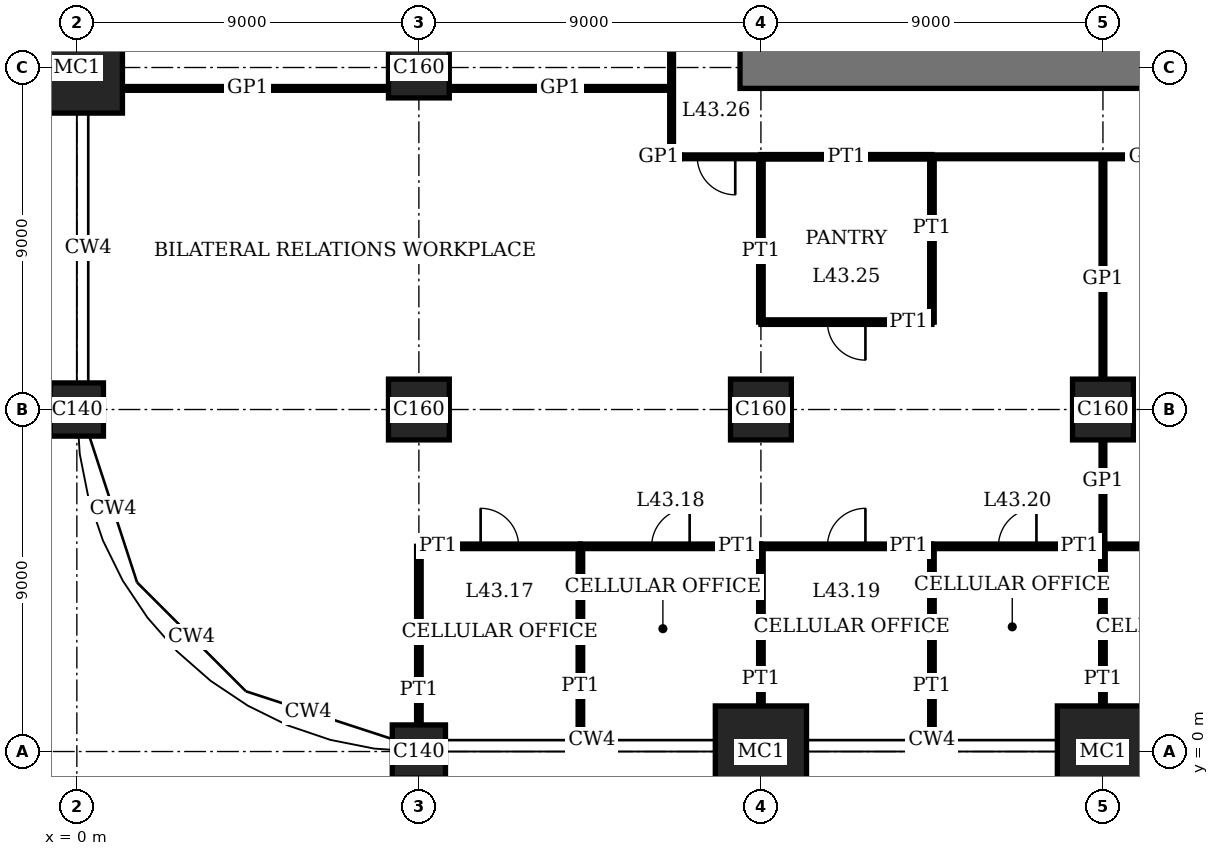
"""IFC4 building model, lengths in metres.
Left out: names, types, materials, properties, quantities, classifications, styles, units other than length and angle.
Written with IfcOpenShell. Run it as: python <this file> out.ifc"""

import sys

from ifc_helpers import new_model, si_unit, direction, frame, frame_2d, origin, origin_2d, place, context, subcontext, project, spatial, rectangle, extrude, element, fill, save


model = new_model("IFC4")
c1 = context("Model", 3, precision=1e-05, world=origin(), true_north=direction((0.0, 1.0)))
c2 = subcontext(c1, "Body", "Model", "MODEL_VIEW")
j1 = project(units=[si_unit("LENGTHUNIT", "METRE"), si_unit("PLANEANGLEUNIT", "RADIAN")], contexts=[c1])
p1 = place(None, origin())
s1 = spatial("IfcSite", under=j1, at=p1, CompositionType="ELEMENT")
p2 = place(p1, origin())
s2 = spatial("IfcBuilding", under=s1, at=p2, CompositionType="ELEMENT")
p3 = place(p2, frame((0.0, 0.0, 178.2)))
s3 = spatial("IfcBuildingStorey", under=s2, at=p3, CompositionType="ELEMENT", Elevation=178.2)
p4 = place(p3, frame((0.0, 9.0, 0.0), z_axis=(0.0, 0.0, 1.0), x_axis=(1.0, 0.0, 0.0)))
e1 = element("IfcColumn", 1, at=p4, inside=s3, PredefinedType="COLUMN", context=c2, shape_type="SweptSolid", body=[
    extrude(rectangle(XDim=1.4, YDim=1.4, at=origin_2d()), origin(), (0.0, 0.0, 1.0), 4.0),
])
p5 = place(p3, frame((0.0, 18.0, 0.0), z_axis=(0.0, 0.0, 1.0), x_axis=(1.0, 0.0, 0.0)))
e2 = element("IfcColumn", 2, at=p5, inside=s3, PredefinedType="COLUMN", context=c2, shape_type="SweptSolid", body=[
    extrude(rectangle(XDim=2.4, YDim=2.4, at=origin_2d()), origin(), (0.0, 0.0, 1.0), 4.0),
])
p6 = place(p3, frame((9.0, 0.0, 0.0), z_axis=(0.0, 0.0, 1.0), x_axis=(1.0, 0.0, 0.0)))
e3 = element("IfcColumn", 3, at=p6, inside=s3, PredefinedType="COLUMN", context=c2, shape_type="SweptSolid", body=[
    extrude(rectangle(XDim=1.4, YDim=1.4, at=origin_2d()), origin(), (0.0, 0.0, 1.0), 4.0),
])
for number, where, z_axis, x_axis in (
    (4, (9.0, 9.0, 0.0), (0.0, 0.0, 1.0), (1.0, 0.0, 0.0)),
    (5, (9.0, 18.0, 0.0), (0.0, 0.0, 1.0), (1.0, 0.0, 0.0)),
):
    element("IfcColumn", number, at=place(p3, frame(where, z_axis=z_axis, x_axis=x_axis)), inside=s3, PredefinedType="COLUMN", context=c2, shape_type="SweptSolid", body=[
        extrude(rectangle(XDim=1.6, YDim=1.6, at=origin_2d()), origin(), (0.0, 0.0, 1.0), 4.0),
    ])
p7 = place(p3, frame((18.0, 0.0, 0.0), z_axis=(0.0, 0.0, 1.0), x_axis=(1.0, 0.0, 0.0)))
e6 = element("IfcColumn", 6, at=p7, inside=s3, PredefinedType="COLUMN", context=c2, shape_type="SweptSolid", body=[
    extrude(rectangle(XDim=2.4, YDim=2.4, at=origin_2d()), origin(), (0.0, 0.0, 1.0), 4.0),
])
p8 = place(p3, frame((18.0, 9.0, 0.0), z_axis=(0.0, 0.0, 1.0), x_axis=(1.0, 0.0, 0.0)))
e7 = element("IfcColumn", 7, at=p8, inside=s3, PredefinedType="COLUMN", context=c2, shape_type="SweptSolid", body=[
    extrude(rectangle(XDim=1.6, YDim=1.6, at=origin_2d()), origin(), (0.0, 0.0, 1.0), 4.0),
])
p9 = place(p3, frame((27.0, 0.0, 0.0), z_axis=(0.0, 0.0, 1.0), x_axis=(1.0, 0.0, 0.0)))
e8 = element("IfcColumn", 8, at=p9, inside=s3, PredefinedType="COLUMN", context=c2, shape_type="SweptSolid", body=[
    extrude(rectangle(XDim=2.4, YDim=2.4, at=origin_2d()), origin(), (0.0, 0.0, 1.0), 4.0),
])
p10 = place(p3, frame((27.0, 9.0, 0.0), z_axis=(0.0, 0.0, 1.0), x_axis=(1.0, 0.0, 0.0)))
e9 = element("IfcColumn", 9, at=p10, inside=s3, PredefinedType="COLUMN", context=c2, shape_type="SweptSolid", body=[
    extrude(rectangle(XDim=1.6, YDim=1.6, at=origin_2d()), origin(), (0.0, 0.0, 1.0), 4.0),
])
p11 = place(p3, frame((17.45, 18.0, 0.0), z_axis=(0.0, 0.0, 1.0), x_axis=(1.0, 0.0, 0.0)))
e10 = element("IfcWall", 10, at=p11, inside=s3, PredefinedType="SHEAR", context=c2, shape_type="SweptSolid", body=[
    extrude(rectangle(XDim=28.1, YDim=1.1, at=frame_2d((14.05, 0.0))), origin(), (0.0, 0.0, 1.0), 4.0),
])
p12 = place(p11, frame((11.55, 0.0, 0.0)))
e11 = element("IfcOpeningElement", 11, at=p12, cuts=e10, PredefinedType="OPENING", context=c2, shape_type="SweptSolid", body=[
    extrude(rectangle(XDim=1.0, YDim=2.4, at=frame_2d((0.5, 1.2))), frame((0.0, 0.56, 0.0), z_axis=(0.0, -1.0, 0.0), x_axis=(1.0, 0.0, 0.0)), (0.0, 0.0, 1.0), 1.12),
])
p13 = place(p11, frame((16.55, 0.0, 0.0)))
e12 = element("IfcOpeningElement", 12, at=p13, cuts=e10, PredefinedType="OPENING", context=c2, shape_type="SweptSolid", body=[
    extrude(rectangle(XDim=1.0, YDim=2.4, at=frame_2d((0.5, 1.2))), frame((0.0, 0.56, 0.0), z_axis=(0.0, -1.0, 0.0), x_axis=(1.0, 0.0, 0.0)), (0.0, 0.0, 1.0), 1.12),
])
p14 = place(p11, frame((20.0, 0.0, 0.0)))
e13 = element("IfcOpeningElement", 13, at=p14, cuts=e10, PredefinedType="OPENING", context=c2, shape_type="SweptSolid", body=[
    extrude(rectangle(XDim=1.1, YDim=2.4, at=frame_2d((0.55, 1.2))), frame((0.0, 0.56, 0.0), z_axis=(0.0, -1.0, 0.0), x_axis=(1.0, 0.0, 0.0)), (0.0, 0.0, 1.0), 1.12),
])
p15 = place(p11, frame((24.05, 0.0, 0.0)))
e14 = element("IfcOpeningElement", 14, at=p15, cuts=e10, PredefinedType="OPENING", context=c2, shape_type="SweptSolid", body=[
    extrude(rectangle(XDim=1.0, YDim=2.4, at=frame_2d((0.5, 1.2))), frame((0.0, 0.56, 0.0), z_axis=(0.0, -1.0, 0.0), x_axis=(1.0, 0.0, 0.0)), (0.0, 0.0, 1.0), 1.12),
])
p16 = place(p3, frame((9.0, 5.4, 0.0), z_axis=(0.0, 0.0, 1.0), x_axis=(1.0, 0.0, 0.0)))
e15 = element("IfcWall", 15, at=p16, inside=s3, PredefinedType="PARTITIONING", context=c2, shape_type="SweptSolid", body=[
    extrude(rectangle(XDim=4.25, YDim=0.12, at=frame_2d((2.125, 0.0))), origin(), (0.0, 0.0, 1.0), 3.75),
])
p17 = place(p16, frame((1.625, 0.0, 0.0)))
e16 = element("IfcOpeningElement", 16, at=p17, cuts=e15, PredefinedType="OPENING", context=c2, shape_type="SweptSolid", body=[
    extrude(rectangle(XDim=1.0, YDim=2.4, at=frame_2d((0.5, 1.2))), frame((0.0, 0.07, 0.0), z_axis=(0.0, -1.0, 0.0), x_axis=(1.0, 0.0, 0.0)), (0.0, 0.0, 1.0), 0.14),
])
p18 = place(p3, frame((13.25, 5.4, 0.0), z_axis=(0.0, 0.0, 1.0), x_axis=(1.0, 0.0, 0.0)))
e17 = element("IfcWall", 17, at=p18, inside=s3, PredefinedType="PARTITIONING", context=c2, shape_type="SweptSolid", body=[
    extrude(rectangle(XDim=4.75, YDim=0.12, at=frame_2d((2.375, 0.0))), origin(), (0.0, 0.0, 1.0), 3.75),
])
p19 = place(p18, frame((1.875, 0.0, 0.0)))
e18 = element("IfcOpeningElement", 18, at=p19, cuts=e17, PredefinedType="OPENING", context=c2, shape_type="SweptSolid", body=[
    extrude(rectangle(XDim=1.0, YDim=2.4, at=frame_2d((0.5, 1.2))), frame((0.0, 0.07, 0.0), z_axis=(0.0, -1.0, 0.0), x_axis=(1.0, 0.0, 0.0)), (0.0, 0.0, 1.0), 0.14),
])
p20 = place(p3, frame((18.0, 5.4, 0.0), z_axis=(0.0, 0.0, 1.0), x_axis=(1.0, 0.0, 0.0)))
e19 = element("IfcWall", 19, at=p20, inside=s3, PredefinedType="PARTITIONING", context=c2, shape_type="SweptSolid", body=[
    extrude(rectangle(XDim=4.5, YDim=0.12, at=frame_2d((2.25, 0.0))), origin(), (0.0, 0.0, 1.0), 3.75),
])
p21 = place(p20, frame((1.75, 0.0, 0.0)))
e20 = element("IfcOpeningElement", 20, at=p21, cuts=e19, PredefinedType="OPENING", context=c2, shape_type="SweptSolid", body=[
    extrude(rectangle(XDim=1.0, YDim=2.4, at=frame_2d((0.5, 1.2))), frame((0.0, 0.07, 0.0), z_axis=(0.0, -1.0, 0.0), x_axis=(1.0, 0.0, 0.0)), (0.0, 0.0, 1.0), 0.14),
])
p22 = place(p3, frame((22.5, 5.4, 0.0), z_axis=(0.0, 0.0, 1.0), x_axis=(1.0, 0.0, 0.0)))
e21 = element("IfcWall", 21, at=p22, inside=s3, PredefinedType="PARTITIONING", context=c2, shape_type="SweptSolid", body=[
    extrude(rectangle(XDim=4.5, YDim=0.12, at=frame_2d((2.25, 0.0))), origin(), (0.0, 0.0, 1.0), 3.75),
])
p23 = place(p22, frame((1.75, 0.0, 0.0)))
e22 = element("IfcOpeningElement", 22, at=p23, cuts=e21, PredefinedType="OPENING", context=c2, shape_type="SweptSolid", body=[
    extrude(rectangle(XDim=1.0, YDim=2.4, at=frame_2d((0.5, 1.2))), frame((0.0, 0.07, 0.0), z_axis=(0.0, -1.0, 0.0), x_axis=(1.0, 0.0, 0.0)), (0.0, 0.0, 1.0), 0.14),
])
p24 = place(p3, frame((27.0, 5.4, 0.0), z_axis=(0.0, 0.0, 1.0), x_axis=(1.0, 0.0, 0.0)))
e23 = element("IfcWall", 23, at=p24, inside=s3, PredefinedType="PARTITIONING", context=c2, shape_type="SweptSolid", body=[
    extrude(rectangle(XDim=4.5, YDim=0.12, at=frame_2d((2.25, 0.0))), origin(), (0.0, 0.0, 1.0), 3.75),
])
p25 = place(p24, frame((1.75, 0.0, 0.0)))
e24 = element("IfcOpeningElement", 24, at=p25, cuts=e23, PredefinedType="OPENING", context=c2, shape_type="SweptSolid", body=[
    extrude(rectangle(XDim=1.0, YDim=2.4, at=frame_2d((0.5, 1.2))), frame((0.0, 0.07, 0.0), z_axis=(0.0, -1.0, 0.0), x_axis=(1.0, 0.0, 0.0)), (0.0, 0.0, 1.0), 0.14),
])
p26 = place(p3, frame((18.0, 11.3, 0.0), z_axis=(0.0, 0.0, 1.0), x_axis=(1.0, 0.0, 0.0)))
e25 = element("IfcWall", 25, at=p26, inside=s3, PredefinedType="PARTITIONING", context=c2, shape_type="SweptSolid", body=[
    extrude(rectangle(XDim=4.5, YDim=0.12, at=frame_2d((2.25, 0.0))), origin(), (0.0, 0.0, 1.0), 3.75),
])
p27 = place(p26, frame((1.75, 0.0, 0.0)))
e26 = element("IfcOpeningElement", 26, at=p27, cuts=e25, PredefinedType="OPENING", context=c2, shape_type="SweptSolid", body=[
    extrude(rectangle(XDim=1.0, YDim=2.4, at=frame_2d((0.5, 1.2))), frame((0.0, 0.07, 0.0), z_axis=(0.0, -1.0, 0.0), x_axis=(1.0, 0.0, 0.0)), (0.0, 0.0, 1.0), 0.14),
])
p28 = place(p3, frame((18.0, 15.65, 0.0), z_axis=(0.0, 0.0, 1.0), x_axis=(1.0, 0.0, 0.0)))
e27 = element("IfcWall", 27, at=p28, inside=s3, PredefinedType="PARTITIONING", context=c2, shape_type="SweptSolid", body=[
    extrude(rectangle(XDim=4.5, YDim=0.12, at=frame_2d((2.25, 0.0))), origin(), (0.0, 0.0, 1.0), 3.75),
])
p29 = place(p3, frame((15.65, 15.65, 0.0), z_axis=(0.0, 0.0, 1.0), x_axis=(1.0, 0.0, 0.0)))
e28 = element("IfcWall", 28, at=p29, inside=s3, PredefinedType="PARTITIONING", context=c2, shape_type="SweptSolid", body=[
    extrude(rectangle(XDim=2.35, YDim=0.1, at=frame_2d((1.175, 0.0))), origin(), (0.0, 0.0, 1.0), 3.75),
])
p30 = place(p29, frame((0.675, 0.0, 0.0)))
e29 = element("IfcOpeningElement", 29, at=p30, cuts=e28, PredefinedType="OPENING", context=c2, shape_type="SweptSolid", body=[
    extrude(rectangle(XDim=1.0, YDim=2.4, at=frame_2d((0.5, 1.2))), frame((0.0, 0.06, 0.0), z_axis=(0.0, -1.0, 0.0), x_axis=(1.0, 0.0, 0.0)), (0.0, 0.0, 1.0), 0.12),
])
p31 = place(p3, frame((22.5, 15.65, 0.0), z_axis=(0.0, 0.0, 1.0), x_axis=(1.0, 0.0, 0.0)))
e30 = element("IfcWall", 30, at=p31, inside=s3, PredefinedType="PARTITIONING", context=c2, shape_type="SweptSolid", body=[
    extrude(rectangle(XDim=24.85, YDim=0.1, at=frame_2d((12.425, 0.0))), origin(), (0.0, 0.0, 1.0), 3.75),
])
p32 = place(p31, frame((11.925, 0.0, 0.0)))
e31 = element("IfcOpeningElement", 31, at=p32, cuts=e30, PredefinedType="OPENING", context=c2, shape_type="SweptSolid", body=[
    extrude(rectangle(XDim=1.0, YDim=2.4, at=frame_2d((0.5, 1.2))), frame((0.0, 0.06, 0.0), z_axis=(0.0, -1.0, 0.0), x_axis=(1.0, 0.0, 0.0)), (0.0, 0.0, 1.0), 0.12),
])
p33 = place(p3, frame((1.2, 17.45, 0.0), z_axis=(0.0, 0.0, 1.0), x_axis=(1.0, 0.0, 0.0)))
e32 = element("IfcWall", 32, at=p33, inside=s3, PredefinedType="PARTITIONING", context=c2, shape_type="SweptSolid", body=[
    extrude(rectangle(XDim=7.0, YDim=0.1, at=frame_2d((3.5, 0.0))), origin(), (0.0, 0.0, 1.0), 3.75),
])
p34 = place(p3, frame((9.8, 17.45, 0.0), z_axis=(0.0, 0.0, 1.0), x_axis=(1.0, 0.0, 0.0)))
e33 = element("IfcWall", 33, at=p34, inside=s3, PredefinedType="PARTITIONING", context=c2, shape_type="SweptSolid", body=[
    extrude(rectangle(XDim=5.85, YDim=0.1, at=frame_2d((2.925, 0.0))), origin(), (0.0, 0.0, 1.0), 3.75),
])
p35 = place(p3, frame((9.0, 0.7, 0.0), z_axis=(0.0, 0.0, 1.0), x_axis=(0.0, 1.0, 0.0)))
e34 = element("IfcWall", 34, at=p35, inside=s3, PredefinedType="PARTITIONING", context=c2, shape_type="SweptSolid", body=[
    extrude(rectangle(XDim=4.7, YDim=0.12, at=frame_2d((2.35, 0.0))), origin(), (0.0, 0.0, 1.0), 3.05),
])
p36 = place(p3, frame((13.25, 0.31, 0.0), z_axis=(0.0, 0.0, 1.0), x_axis=(0.0, 1.0, 0.0)))
e35 = element("IfcWall", 35, at=p36, inside=s3, PredefinedType="PARTITIONING", context=c2, shape_type="SweptSolid", body=[
    extrude(rectangle(XDim=5.09, YDim=0.12, at=frame_2d((2.545, 0.0))), origin(), (0.0, 0.0, 1.0), 3.75),
])
p37 = place(p3, frame((15.65, 15.65, 0.0), z_axis=(0.0, 0.0, 1.0), x_axis=(0.0, 1.0, 0.0)))
e36 = element("IfcWall", 36, at=p37, inside=s3, PredefinedType="PARTITIONING", context=c2, shape_type="SweptSolid", body=[
    extrude(rectangle(XDim=6.85, YDim=0.1, at=frame_2d((3.425, 0.0))), origin(), (0.0, 0.0, 1.0), 3.75),
])
p38 = place(p37, frame((2.925, 0.0, 0.0)))
e37 = element("IfcOpeningElement", 37, at=p38, cuts=e36, PredefinedType="OPENING", context=c2, shape_type="SweptSolid", body=[
    extrude(rectangle(XDim=1.0, YDim=2.4, at=frame_2d((0.5, 1.2))), frame((0.0, 0.06, 0.0), z_axis=(0.0, -1.0, 0.0), x_axis=(1.0, 0.0, 0.0)), (0.0, 0.0, 1.0), 0.12),
])
p39 = place(p3, frame((18.0, 1.2, 0.0), z_axis=(0.0, 0.0, 1.0), x_axis=(0.0, 1.0, 0.0)))
e38 = element("IfcWall", 38, at=p39, inside=s3, PredefinedType="PARTITIONING", context=c2, shape_type="SweptSolid", body=[
    extrude(rectangle(XDim=4.2, YDim=0.12, at=frame_2d((2.1, 0.0))), origin(), (0.0, 0.0, 1.0), 3.05),
])
p40 = place(p3, frame((18.0, 11.3, 0.0), z_axis=(0.0, 0.0, 1.0), x_axis=(0.0, 1.0, 0.0)))
e39 = element("IfcWall", 39, at=p40, inside=s3, PredefinedType="PARTITIONING", context=c2, shape_type="SweptSolid", body=[
    extrude(rectangle(XDim=4.35, YDim=0.12, at=frame_2d((2.175, 0.0))), origin(), (0.0, 0.0, 1.0), 3.05),
])
p41 = place(p3, frame((22.5, 0.31, 0.0), z_axis=(0.0, 0.0, 1.0), x_axis=(0.0, 1.0, 0.0)))
e40 = element("IfcWall", 40, at=p41, inside=s3, PredefinedType="PARTITIONING", context=c2, shape_type="SweptSolid", body=[
    extrude(rectangle(XDim=5.09, YDim=0.12, at=frame_2d((2.545, 0.0))), origin(), (0.0, 0.0, 1.0), 3.75),
])
p42 = place(p3, frame((22.5, 11.3, 0.0), z_axis=(0.0, 0.0, 1.0), x_axis=(0.0, 1.0, 0.0)))
e41 = element("IfcWall", 41, at=p42, inside=s3, PredefinedType="PARTITIONING", context=c2, shape_type="SweptSolid", body=[
    extrude(rectangle(XDim=4.35, YDim=0.12, at=frame_2d((2.175, 0.0))), origin(), (0.0, 0.0, 1.0), 3.75),
])
p43 = place(p3, frame((27.0, 1.2, 0.0), z_axis=(0.0, 0.0, 1.0), x_axis=(0.0, 1.0, 0.0)))
e42 = element("IfcWall", 42, at=p43, inside=s3, PredefinedType="PARTITIONING", context=c2, shape_type="SweptSolid", body=[
    extrude(rectangle(XDim=4.2, YDim=0.12, at=frame_2d((2.1, 0.0))), origin(), (0.0, 0.0, 1.0), 3.05),
])
p44 = place(p3, frame((27.0, 5.4, 0.0), z_axis=(0.0, 0.0, 1.0), x_axis=(0.0, 1.0, 0.0)))
e43 = element("IfcWall", 43, at=p44, inside=s3, PredefinedType="PARTITIONING", context=c2, shape_type="SweptSolid", body=[
    extrude(rectangle(XDim=2.8, YDim=0.1, at=frame_2d((1.4, 0.0))), origin(), (0.0, 0.0, 1.0), 3.05),
])
p45 = place(p3, frame((27.0, 9.8, 0.0), z_axis=(0.0, 0.0, 1.0), x_axis=(0.0, 1.0, 0.0)))
e44 = element("IfcWall", 44, at=p45, inside=s3, PredefinedType="PARTITIONING", context=c2, shape_type="SweptSolid", body=[
    extrude(rectangle(XDim=5.85, YDim=0.1, at=frame_2d((2.925, 0.0))), origin(), (0.0, 0.0, 1.0), 3.05),
])
p46 = place(p17, origin())
e45 = element("IfcDoor", 45, at=p46, inside=s3, OperationType="SINGLE_SWING_RIGHT", PredefinedType="DOOR", context=c2, shape_type="SweptSolid", body=[
    extrude(rectangle(XDim=1.0, YDim=2.4, at=frame_2d((0.5, 1.2))), frame((0.0, 0.025, 0.0), z_axis=(0.0, -1.0, 0.0), x_axis=(1.0, 0.0, 0.0)), (0.0, 0.0, 1.0), 0.05),
])
fill(e16, e45)
p47 = place(p19, origin())
e46 = element("IfcDoor", 46, at=p47, inside=s3, OperationType="SINGLE_SWING_LEFT", PredefinedType="DOOR", context=c2, shape_type="SweptSolid", body=[
    extrude(rectangle(XDim=1.0, YDim=2.4, at=frame_2d((0.5, 1.2))), frame((0.0, 0.025, 0.0), z_axis=(0.0, -1.0, 0.0), x_axis=(1.0, 0.0, 0.0)), (0.0, 0.0, 1.0), 0.05),
])
fill(e18, e46)
p48 = place(p21, origin())
e47 = element("IfcDoor", 47, at=p48, inside=s3, OperationType="SINGLE_SWING_LEFT", PredefinedType="DOOR", context=c2, shape_type="SweptSolid", body=[
    extrude(rectangle(XDim=1.0, YDim=2.4, at=frame_2d((0.5, 1.2))), frame((0.0, 0.025, 0.0), z_axis=(0.0, -1.0, 0.0), x_axis=(1.0, 0.0, 0.0)), (0.0, 0.0, 1.0), 0.05),
])
fill(e20, e47)
p49 = place(p23, origin())
e48 = element("IfcDoor", 48, at=p49, inside=s3, OperationType="SINGLE_SWING_LEFT", PredefinedType="DOOR", context=c2, shape_type="SweptSolid", body=[
    extrude(rectangle(XDim=1.0, YDim=2.4, at=frame_2d((0.5, 1.2))), frame((0.0, 0.025, 0.0), z_axis=(0.0, -1.0, 0.0), x_axis=(1.0, 0.0, 0.0)), (0.0, 0.0, 1.0), 0.05),
])
fill(e22, e48)
p50 = place(p27, origin())
e49 = element("IfcDoor", 49, at=p50, inside=s3, OperationType="SINGLE_SWING_RIGHT", PredefinedType="DOOR", context=c2, shape_type="SweptSolid", body=[
    extrude(rectangle(XDim=1.0, YDim=2.4, at=frame_2d((0.5, 1.2))), frame((0.0, 0.025, 0.0), z_axis=(0.0, -1.0, 0.0), x_axis=(1.0, 0.0, 0.0)), (0.0, 0.0, 1.0), 0.05),
])
fill(e26, e49)
p51 = place(p30, origin())
e50 = element("IfcDoor", 50, at=p51, inside=s3, OperationType="SINGLE_SWING_RIGHT", PredefinedType="DOOR", context=c2, shape_type="SweptSolid", body=[
    extrude(rectangle(XDim=1.0, YDim=2.4, at=frame_2d((0.5, 1.2))), frame((0.0, 0.02, 0.0), z_axis=(0.0, -1.0, 0.0), x_axis=(1.0, 0.0, 0.0)), (0.0, 0.0, 1.0), 0.04),
])
fill(e29, e50)
save(model, sys.argv[1])
